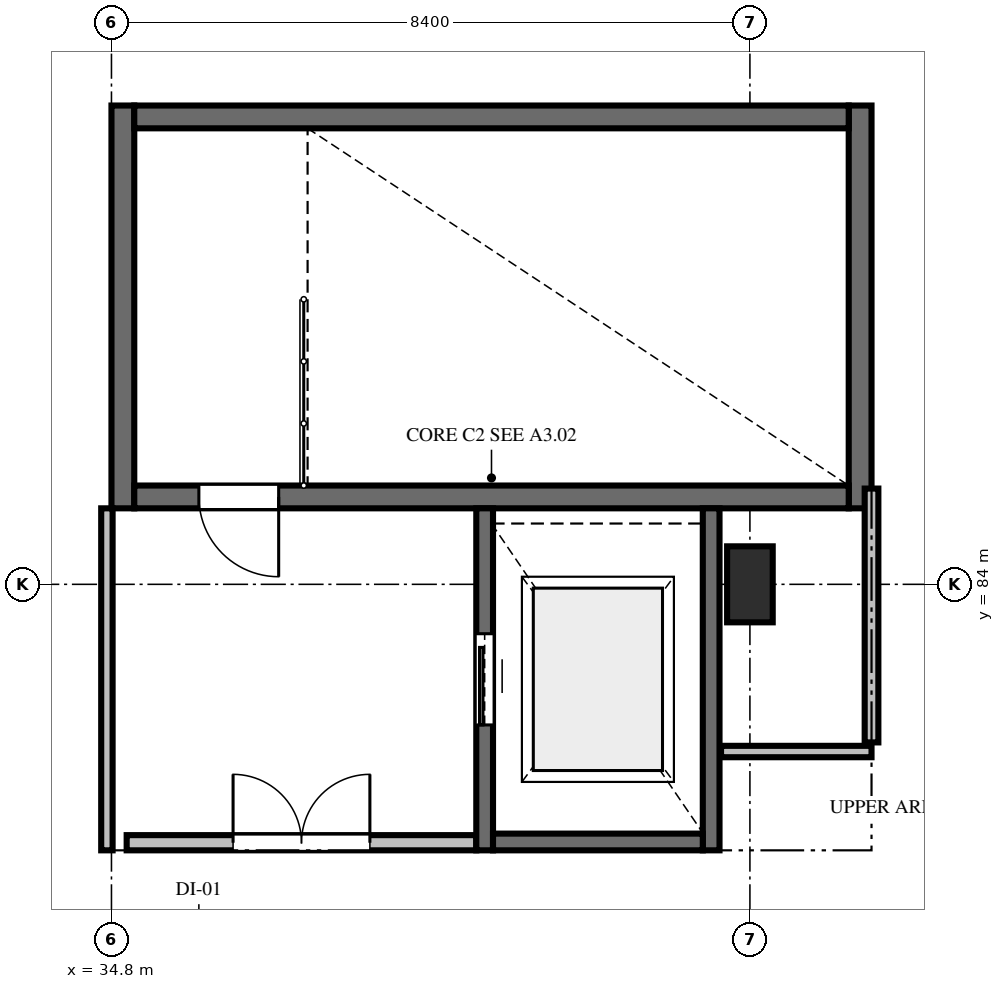
"""IFC4 building model, lengths in metres.
Left out: names, types, materials, properties, quantities, classifications, styles, units other than length and angle.
Written with IfcOpenShell. Run it as: python <this file> out.ifc"""

import sys

from ifc_helpers import new_model, si_unit, direction, frame, frame_2d, origin, origin_2d, place, context, subcontext, project, spatial, rectangle, extrude, element, fill, save


model = new_model("IFC4")
c1 = context("Model", 3, precision=1e-05, world=origin(), true_north=direction((0.0, 1.0)))
c2 = subcontext(c1, "Body", "Model", "MODEL_VIEW")
j1 = project(units=[si_unit("LENGTHUNIT", "METRE"), si_unit("PLANEANGLEUNIT", "RADIAN")], contexts=[c1])
p1 = place(None, origin())
s1 = spatial("IfcSite", under=j1, at=p1, CompositionType="ELEMENT")
p2 = place(p1, origin())
s2 = spatial("IfcBuilding", under=s1, at=p2, CompositionType="ELEMENT")
p3 = place(p2, frame((0.0, 0.0, 16.8)))
s3 = spatial("IfcBuildingStorey", under=s2, at=p3, CompositionType="ELEMENT", Elevation=16.8)
p4 = place(p3, frame((43.2, 84.0, 0.0), z_axis=(0.0, 0.0, 1.0), x_axis=(1.0, 0.0, 0.0)))
e1 = element("IfcColumn", 1, at=p4, inside=s3, PredefinedType="COLUMN", context=c2, shape_type="SweptSolid", body=[
    extrude(rectangle(XDim=0.6, YDim=1.0, at=origin_2d()), origin(), (0.0, 0.0, 1.0), 5.4),
])
for number, where, z_axis, x_axis in (
    (2, (34.95, 85.0, 0.0), (0.0, 0.0, 1.0), (0.0, 1.0, 0.0)),
    (3, (44.65, 90.3, 0.0), (0.0, 0.0, 1.0), (0.0, -1.0, 0.0)),
):
    element("IfcWall", number, at=place(p3, frame(where, z_axis=z_axis, x_axis=x_axis)), inside=s3, PredefinedType="SHEAR", context=c2, shape_type="SweptSolid", body=[
        extrude(rectangle(XDim=5.3, YDim=0.3, at=frame_2d((2.65, 0.0))), origin(), (0.0, 0.0, 1.0), 5.07),
    ])
p5 = place(p3, frame((44.5, 85.15, 0.0), z_axis=(0.0, 0.0, 1.0), x_axis=(-1.0, 0.0, 0.0)))
e4 = element("IfcWall", 4, at=p5, inside=s3, PredefinedType="SHEAR", context=c2, shape_type="SweptSolid", body=[
    extrude(rectangle(XDim=9.4, YDim=0.3, at=frame_2d((4.7, 0.0))), origin(), (0.0, 0.0, 1.0), 5.07),
])
p6 = place(p5, frame((7.5, 0.0, 0.0)))
e5 = element("IfcOpeningElement", 5, at=p6, cuts=e4, PredefinedType="OPENING", context=c2, shape_type="SweptSolid", body=[
    extrude(rectangle(XDim=1.05, YDim=2.2, at=frame_2d((0.525, 1.1))), frame((0.0, 0.16, 0.0), z_axis=(0.0, -1.0, 0.0), x_axis=(1.0, 0.0, 0.0)), (0.0, 0.0, 1.0), 0.32),
])
p7 = place(p3, frame((35.1, 90.15, 0.0), z_axis=(0.0, 0.0, 1.0), x_axis=(1.0, 0.0, 0.0)))
e6 = element("IfcWall", 6, at=p7, inside=s3, PredefinedType="SHEAR", context=c2, shape_type="SweptSolid", body=[
    extrude(rectangle(XDim=9.4, YDim=0.3, at=frame_2d((4.7, 0.0))), origin(), (0.0, 0.0, 1.0), 5.07),
])
p8 = place(p3, frame((35.0, 80.6, 0.0), z_axis=(0.0, 0.0, 1.0), x_axis=(1.0, 0.0, 0.0)))
e7 = element("IfcWall", 7, at=p8, inside=s3, PredefinedType="SOLIDWALL", context=c2, shape_type="SweptSolid", body=[
    extrude(rectangle(XDim=4.6, YDim=0.2, at=frame_2d((2.3, 0.0))), origin(), (0.0, 0.0, 1.0), 4.31),
])
p9 = place(p8, frame((1.4, 0.0, 0.0)))
e8 = element("IfcOpeningElement", 8, at=p9, cuts=e7, PredefinedType="OPENING", context=c2, shape_type="SweptSolid", body=[
    extrude(rectangle(XDim=1.8, YDim=2.2, at=frame_2d((0.9, 1.1))), frame((0.0, 0.11, 0.0), z_axis=(0.0, -1.0, 0.0), x_axis=(1.0, 0.0, 0.0)), (0.0, 0.0, 1.0), 0.22),
])
p10 = place(p3, frame((39.71, 80.5, 0.0), z_axis=(0.0, 0.0, 1.0), x_axis=(0.0, 1.0, 0.0)))
e9 = element("IfcWall", 9, at=p10, inside=s3, PredefinedType="SOLIDWALL", context=c2, shape_type="SweptSolid", body=[
    extrude(rectangle(XDim=4.5, YDim=0.22, at=frame_2d((2.25, 0.0))), origin(), (0.0, 0.0, 1.0), 5.07),
])
p11 = place(p10, frame((1.65, 0.0, 0.0)))
e10 = element("IfcOpeningElement", 10, at=p11, cuts=e9, PredefinedType="OPENING", context=c2, shape_type="SweptSolid", body=[
    extrude(rectangle(XDim=1.2, YDim=2.2, at=frame_2d((0.6, 1.1))), frame((0.0, 0.12, 0.0), z_axis=(0.0, -1.0, 0.0), x_axis=(1.0, 0.0, 0.0)), (0.0, 0.0, 1.0), 0.24),
])
p12 = place(p3, frame((42.69, 80.5, 0.0), z_axis=(0.0, 0.0, 1.0), x_axis=(0.0, 1.0, 0.0)))
e11 = element("IfcWall", 11, at=p12, inside=s3, PredefinedType="SOLIDWALL", context=c2, shape_type="SweptSolid", body=[
    extrude(rectangle(XDim=4.5, YDim=0.22, at=frame_2d((2.25, 0.0))), origin(), (0.0, 0.0, 1.0), 5.07),
])
p13 = place(p3, frame((39.82, 80.61, 0.0), z_axis=(0.0, 0.0, 1.0), x_axis=(1.0, 0.0, 0.0)))
e12 = element("IfcWall", 12, at=p13, inside=s3, PredefinedType="SOLIDWALL", context=c2, shape_type="SweptSolid", body=[
    extrude(rectangle(XDim=2.76, YDim=0.22, at=frame_2d((1.38, 0.0))), origin(), (0.0, 0.0, 1.0), 5.07),
])
p14 = place(p3, frame((34.74, 85.0, 0.0), z_axis=(0.0, 0.0, 1.0), x_axis=(0.0, -1.0, 0.0)))
e13 = element("IfcWall", 13, at=p14, inside=s3, PredefinedType="PARTITIONING", context=c2, shape_type="SweptSolid", body=[
    extrude(rectangle(XDim=4.5, YDim=0.15, at=frame_2d((2.25, 0.0))), origin(), (0.0, 0.0, 1.0), 4.31),
])
p15 = place(p3, frame((42.82, 81.8, 0.0), z_axis=(0.0, 0.0, 1.0), x_axis=(1.0, 0.0, 0.0)))
e14 = element("IfcWall", 14, at=p15, inside=s3, PredefinedType="PARTITIONING", context=c2, shape_type="SweptSolid", body=[
    extrude(rectangle(XDim=1.98, YDim=0.15, at=frame_2d((0.99, 0.0))), origin(), (0.0, 0.0, 1.0), 4.318),
])
p16 = place(p3, frame((44.8, 81.92, 0.0), z_axis=(0.0, 0.0, 1.0), x_axis=(0.0, 1.0, 0.0)))
e15 = element("IfcWall", 15, at=p16, inside=s3, PredefinedType="PARTITIONING", context=c2, shape_type="SweptSolid", body=[
    extrude(rectangle(XDim=3.34, YDim=0.18, at=frame_2d((1.67, 0.0))), origin(), (0.0, 0.0, 1.0), 4.218),
])
p17 = place(p6, origin())
e16 = element("IfcDoor", 16, at=p17, inside=s3, OperationType="SINGLE_SWING_LEFT", PredefinedType="DOOR", context=c2, shape_type="SweptSolid", body=[
    extrude(rectangle(XDim=1.05, YDim=2.2, at=frame_2d((0.525, 1.1))), frame((0.0, 0.025, 0.0), z_axis=(0.0, -1.0, 0.0), x_axis=(1.0, 0.0, 0.0)), (0.0, 0.0, 1.0), 0.05),
])
fill(e5, e16)
p18 = place(p9, origin())
e17 = element("IfcDoor", 17, at=p18, inside=s3, OperationType="DOUBLE_DOOR_SINGLE_SWING", PredefinedType="DOOR", context=c2, shape_type="SweptSolid", body=[
    extrude(rectangle(XDim=1.8, YDim=2.2, at=frame_2d((0.9, 1.1))), frame((0.0, 0.025, 0.0), z_axis=(0.0, -1.0, 0.0), x_axis=(1.0, 0.0, 0.0)), (0.0, 0.0, 1.0), 0.05),
])
fill(e8, e17)
p19 = place(p11, origin())
e18 = element("IfcDoor", 18, at=p19, inside=s3, OperationType="SLIDING_TO_LEFT", PredefinedType="DOOR", context=c2, shape_type="SweptSolid", body=[
    extrude(rectangle(XDim=1.2, YDim=2.2, at=frame_2d((0.6, 1.1))), frame((0.0, 0.025, 0.0), z_axis=(0.0, -1.0, 0.0), x_axis=(1.0, 0.0, 0.0)), (0.0, 0.0, 1.0), 0.05),
])
fill(e10, e18)
save(model, sys.argv[1])
